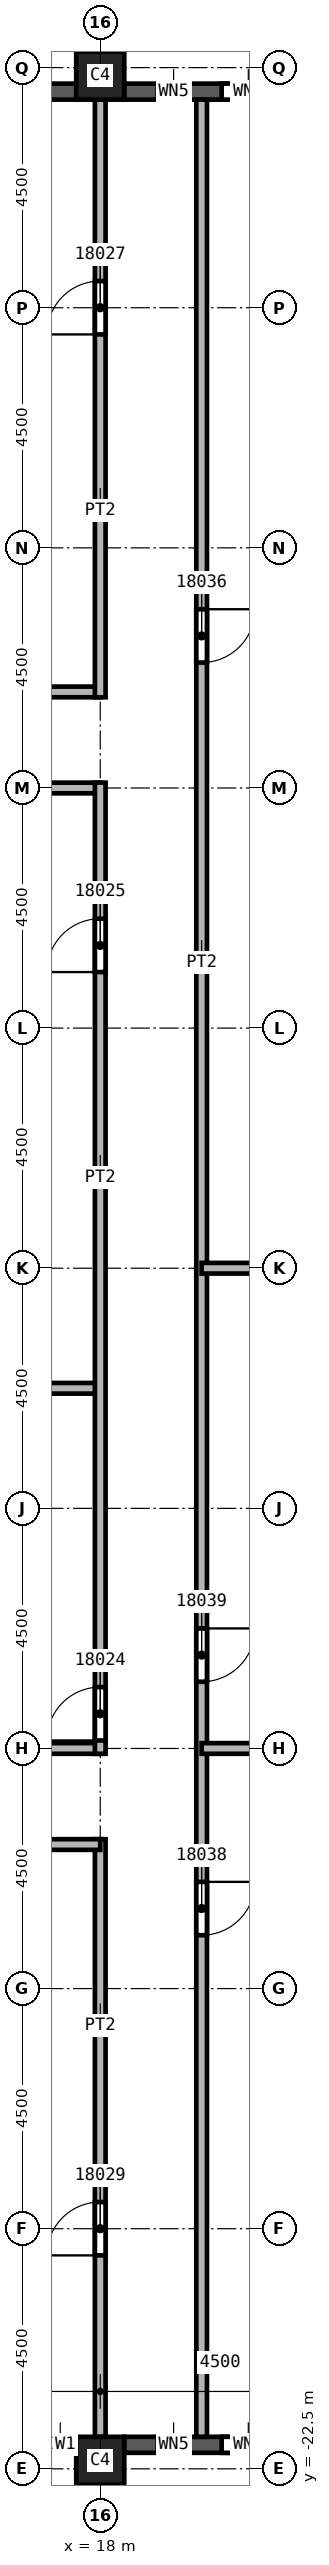
"""IFC4 building model, lengths in metres.
Left out: names, types, materials, properties, quantities, classifications, styles, units other than length and angle.
Written with IfcOpenShell. Run it as: python <this file> out.ifc"""

import sys

from ifc_helpers import new_model, si_unit, direction, frame, frame_2d, origin, origin_2d, place, context, subcontext, project, spatial, rectangle, extrude, element, fill, save


model = new_model("IFC4")
c1 = context("Model", 3, precision=1e-05, world=origin(), true_north=direction((0.0, 1.0)))
c2 = subcontext(c1, "Body", "Model", "MODEL_VIEW")
j1 = project(units=[si_unit("LENGTHUNIT", "METRE"), si_unit("PLANEANGLEUNIT", "RADIAN")], contexts=[c1])
p1 = place(None, origin())
s1 = spatial("IfcSite", under=j1, at=p1, CompositionType="ELEMENT")
p2 = place(p1, origin())
s2 = spatial("IfcBuilding", under=s1, at=p2, CompositionType="ELEMENT")
p3 = place(p2, frame((0.0, 0.0, 266.0)))
s3 = spatial("IfcBuildingStorey", under=s2, at=p3, CompositionType="ELEMENT", Elevation=266.0)
for number, where, z_axis, x_axis in (
    (1, (18.0, 22.35, 0.0), (0.0, 0.0, 1.0), (1.0, 0.0, 0.0)),
    (2, (18.0, -22.35, 0.0), (0.0, 0.0, 1.0), (1.0, 0.0, 0.0)),
):
    element("IfcColumn", number, at=place(p3, frame(where, z_axis=z_axis, x_axis=x_axis)), inside=s3, PredefinedType="COLUMN", context=c2, shape_type="SweptSolid", body=[
        extrude(rectangle(XDim=0.9, YDim=0.9, at=origin_2d()), origin(), (0.0, 0.0, 1.0), 3.72),
    ])
p4 = place(p3, frame((13.95, -22.05, 0.0), z_axis=(0.0, 0.0, 1.0), x_axis=(1.0, 0.0, 0.0)))
e3 = element("IfcWall", 3, at=p4, inside=s3, PredefinedType="SOLIDWALL", context=c2, shape_type="SweptSolid", body=[
    extrude(rectangle(XDim=3.6, YDim=0.3, at=frame_2d((1.8, 0.0))), origin(), (0.0, 0.0, 1.0), 3.12),
])
p5 = place(p4, frame((0.6, 0.0, 0.8)))
e4 = element("IfcOpeningElement", 4, at=p5, cuts=e3, PredefinedType="OPENING", context=c2, shape_type="SweptSolid", body=[
    extrude(rectangle(XDim=2.4, YDim=1.95, at=frame_2d((1.2, 0.975))), frame((0.0, 0.15, 0.0), z_axis=(0.0, -1.0, 0.0), x_axis=(1.0, 0.0, 0.0)), (0.0, 0.0, 1.0), 0.3),
])
p6 = place(p3, frame((18.45, -22.05, 0.0), z_axis=(0.0, 0.0, 1.0), x_axis=(1.0, 0.0, 0.0)))
e5 = element("IfcWall", 5, at=p6, inside=s3, PredefinedType="SOLIDWALL", context=c2, shape_type="SweptSolid", body=[
    extrude(rectangle(XDim=3.6, YDim=0.3, at=frame_2d((1.8, 0.0))), origin(), (0.0, 0.0, 1.0), 3.12),
])
p7 = place(p6, frame((0.625, 0.0, 0.8)))
e6 = element("IfcOpeningElement", 6, at=p7, cuts=e5, PredefinedType="OPENING", context=c2, shape_type="SweptSolid", body=[
    extrude(rectangle(XDim=0.6, YDim=1.95, at=frame_2d((0.3, 0.975))), frame((0.0, 0.15, 0.0), z_axis=(0.0, -1.0, 0.0), x_axis=(1.0, 0.0, 0.0)), (0.0, 0.0, 1.0), 0.3),
])
p8 = place(p6, frame((1.825, 0.0, 0.8)))
e7 = element("IfcOpeningElement", 7, at=p8, cuts=e5, PredefinedType="OPENING", context=c2, shape_type="SweptSolid", body=[
    extrude(rectangle(XDim=1.0, YDim=1.95, at=frame_2d((0.5, 0.975))), frame((0.0, 0.15, 0.0), z_axis=(0.0, -1.0, 0.0), x_axis=(1.0, 0.0, 0.0)), (0.0, 0.0, 1.0), 0.3),
])
p9 = place(p3, frame((22.05, 22.05, 0.0), z_axis=(0.0, 0.0, 1.0), x_axis=(-1.0, 0.0, 0.0)))
e8 = element("IfcWall", 8, at=p9, inside=s3, PredefinedType="SOLIDWALL", context=c2, shape_type="SweptSolid", body=[
    extrude(rectangle(XDim=3.6, YDim=0.3, at=frame_2d((1.8, 0.0))), origin(), (0.0, 0.0, 1.0), 3.12),
])
p10 = place(p9, frame((0.775, 0.0, 0.8)))
e9 = element("IfcOpeningElement", 9, at=p10, cuts=e8, PredefinedType="OPENING", context=c2, shape_type="SweptSolid", body=[
    extrude(rectangle(XDim=1.0, YDim=1.95, at=frame_2d((0.5, 0.975))), frame((0.0, 0.15, 0.0), z_axis=(0.0, -1.0, 0.0), x_axis=(1.0, 0.0, 0.0)), (0.0, 0.0, 1.0), 0.3),
])
p11 = place(p9, frame((2.375, 0.0, 0.8)))
e10 = element("IfcOpeningElement", 10, at=p11, cuts=e8, PredefinedType="OPENING", context=c2, shape_type="SweptSolid", body=[
    extrude(rectangle(XDim=0.6, YDim=1.95, at=frame_2d((0.3, 0.975))), frame((0.0, 0.15, 0.0), z_axis=(0.0, -1.0, 0.0), x_axis=(1.0, 0.0, 0.0)), (0.0, 0.0, 1.0), 0.3),
])
p12 = place(p3, frame((17.55, 22.05, 0.0), z_axis=(0.0, 0.0, 1.0), x_axis=(-1.0, 0.0, 0.0)))
e11 = element("IfcWall", 11, at=p12, inside=s3, PredefinedType="SOLIDWALL", context=c2, shape_type="SweptSolid", body=[
    extrude(rectangle(XDim=3.6, YDim=0.3, at=frame_2d((1.8, 0.0))), origin(), (0.0, 0.0, 1.0), 3.12),
])
p13 = place(p12, frame((0.6, 0.0, 0.8)))
e12 = element("IfcOpeningElement", 12, at=p13, cuts=e11, PredefinedType="OPENING", context=c2, shape_type="SweptSolid", body=[
    extrude(rectangle(XDim=2.4, YDim=1.95, at=frame_2d((1.2, 0.975))), frame((0.0, 0.15, 0.0), z_axis=(0.0, -1.0, 0.0), x_axis=(1.0, 0.0, 0.0)), (0.0, 0.0, 1.0), 0.3),
])
for number, where, z_axis, x_axis in (
    (13, (13.5, -9.0, 0.0), (0.0, 0.0, 1.0), (1.0, 0.0, 0.0)),
    (14, (13.5, -2.25, 0.0), (0.0, 0.0, 1.0), (1.0, 0.0, 0.0)),
    (15, (18.0, 9.0, 0.0), (0.0, 0.0, 1.0), (-1.0, 0.0, 0.0)),
):
    element("IfcWall", number, at=place(p3, frame(where, z_axis=z_axis, x_axis=x_axis)), inside=s3, PredefinedType="PARTITIONING", context=c2, shape_type="SweptSolid", body=[
        extrude(rectangle(XDim=4.5, YDim=0.2, at=frame_2d((2.25, 0.0))), origin(), (0.0, 0.0, 1.0), 3.72),
    ])
p14 = place(p3, frame((14.4, 10.8, 0.0), z_axis=(0.0, 0.0, 1.0), x_axis=(1.0, 0.0, 0.0)))
e16 = element("IfcWall", 16, at=p14, inside=s3, PredefinedType="PARTITIONING", context=c2, shape_type="SweptSolid", body=[
    extrude(rectangle(XDim=3.6, YDim=0.2, at=frame_2d((1.8, 0.0))), origin(), (0.0, 0.0, 1.0), 3.72),
])
p15 = place(p3, frame((18.0, -21.9, 0.0), z_axis=(0.0, 0.0, 1.0), x_axis=(0.0, 1.0, 0.0)))
e17 = element("IfcWall", 17, at=p15, inside=s3, PredefinedType="PARTITIONING", context=c2, shape_type="SweptSolid", body=[
    extrude(rectangle(XDim=11.2, YDim=0.2, at=frame_2d((5.6, 0.0))), origin(), (0.0, 0.0, 1.0), 3.72),
])
p16 = place(p15, frame((3.4, 0.0, 0.0)))
e18 = element("IfcOpeningElement", 18, at=p16, cuts=e17, PredefinedType="OPENING", context=c2, shape_type="SweptSolid", body=[
    extrude(rectangle(XDim=1.0, YDim=2.1, at=frame_2d((0.5, 1.05))), frame((0.0, 0.1, 0.0), z_axis=(0.0, -1.0, 0.0), x_axis=(1.0, 0.0, 0.0)), (0.0, 0.0, 1.0), 0.2),
])
p17 = place(p3, frame((18.0, -10.8, 0.0), z_axis=(0.0, 0.0, 1.0), x_axis=(-1.0, 0.0, 0.0)))
e19 = element("IfcWall", 19, at=p17, inside=s3, PredefinedType="PARTITIONING", context=c2, shape_type="SweptSolid", body=[
    extrude(rectangle(XDim=3.6, YDim=0.2, at=frame_2d((1.8, 0.0))), origin(), (0.0, 0.0, 1.0), 3.72),
])
p18 = place(p3, frame((18.0, -9.1, 0.0), z_axis=(0.0, 0.0, 1.0), x_axis=(0.0, 1.0, 0.0)))
e20 = element("IfcWall", 20, at=p18, inside=s3, PredefinedType="PARTITIONING", context=c2, shape_type="SweptSolid", body=[
    extrude(rectangle(XDim=18.2, YDim=0.2, at=frame_2d((9.1, 0.0))), origin(), (0.0, 0.0, 1.0), 3.72),
])
p19 = place(p18, frame((0.25, 0.0, 0.0)))
e21 = element("IfcOpeningElement", 21, at=p19, cuts=e20, PredefinedType="OPENING", context=c2, shape_type="SweptSolid", body=[
    extrude(rectangle(XDim=1.0, YDim=2.1, at=frame_2d((0.5, 1.05))), frame((0.0, 0.1, 0.0), z_axis=(0.0, -1.0, 0.0), x_axis=(1.0, 0.0, 0.0)), (0.0, 0.0, 1.0), 0.2),
])
p20 = place(p18, frame((14.65, 0.0, 0.0)))
e22 = element("IfcOpeningElement", 22, at=p20, cuts=e20, PredefinedType="OPENING", context=c2, shape_type="SweptSolid", body=[
    extrude(rectangle(XDim=1.0, YDim=2.1, at=frame_2d((0.5, 1.05))), frame((0.0, 0.1, 0.0), z_axis=(0.0, -1.0, 0.0), x_axis=(1.0, 0.0, 0.0)), (0.0, 0.0, 1.0), 0.2),
])
p21 = place(p3, frame((18.0, 10.7, 0.0), z_axis=(0.0, 0.0, 1.0), x_axis=(0.0, 1.0, 0.0)))
e23 = element("IfcWall", 23, at=p21, inside=s3, PredefinedType="PARTITIONING", context=c2, shape_type="SweptSolid", body=[
    extrude(rectangle(XDim=11.2, YDim=0.2, at=frame_2d((5.6, 0.0))), origin(), (0.0, 0.0, 1.0), 3.72),
])
p22 = place(p21, frame((6.8, 0.0, 0.0)))
e24 = element("IfcOpeningElement", 24, at=p22, cuts=e23, PredefinedType="OPENING", context=c2, shape_type="SweptSolid", body=[
    extrude(rectangle(XDim=1.0, YDim=2.1, at=frame_2d((0.5, 1.05))), frame((0.0, 0.1, 0.0), z_axis=(0.0, -1.0, 0.0), x_axis=(1.0, 0.0, 0.0)), (0.0, 0.0, 1.0), 0.2),
])
p23 = place(p3, frame((19.9, 21.9, 0.0), z_axis=(0.0, 0.0, 1.0), x_axis=(0.0, -1.0, 0.0)))
e25 = element("IfcWall", 25, at=p23, inside=s3, PredefinedType="PARTITIONING", context=c2, shape_type="SweptSolid", body=[
    extrude(rectangle(XDim=43.8, YDim=0.2, at=frame_2d((21.9, 0.0))), origin(), (0.0, 0.0, 1.0), 3.72),
])
p24 = place(p23, frame((9.55, 0.0, 0.0)))
e26 = element("IfcOpeningElement", 26, at=p24, cuts=e25, PredefinedType="OPENING", context=c2, shape_type="SweptSolid", body=[
    extrude(rectangle(XDim=1.0, YDim=2.1, at=frame_2d((0.5, 1.05))), frame((0.0, 0.1, 0.0), z_axis=(0.0, -1.0, 0.0), x_axis=(1.0, 0.0, 0.0)), (0.0, 0.0, 1.0), 0.2),
])
p25 = place(p23, frame((33.4, 0.0, 0.0)))
e27 = element("IfcOpeningElement", 27, at=p25, cuts=e25, PredefinedType="OPENING", context=c2, shape_type="SweptSolid", body=[
    extrude(rectangle(XDim=1.0, YDim=2.1, at=frame_2d((0.5, 1.05))), frame((0.0, 0.1, 0.0), z_axis=(0.0, -1.0, 0.0), x_axis=(1.0, 0.0, 0.0)), (0.0, 0.0, 1.0), 0.2),
])
p26 = place(p23, frame((28.65, 0.0, 0.0)))
e28 = element("IfcOpeningElement", 28, at=p26, cuts=e25, PredefinedType="OPENING", context=c2, shape_type="SweptSolid", body=[
    extrude(rectangle(XDim=1.0, YDim=2.1, at=frame_2d((0.5, 1.05))), frame((0.0, 0.1, 0.0), z_axis=(0.0, -1.0, 0.0), x_axis=(1.0, 0.0, 0.0)), (0.0, 0.0, 1.0), 0.2),
])
for number, where, z_axis, x_axis in (
    (29, (19.9, -9.0, 0.0), (0.0, 0.0, 1.0), (1.0, 0.0, 0.0)),
    (30, (26.55, 0.0, 0.0), (0.0, 0.0, 1.0), (-1.0, 0.0, 0.0)),
):
    element("IfcWall", number, at=place(p3, frame(where, z_axis=z_axis, x_axis=x_axis)), inside=s3, PredefinedType="PARTITIONING", context=c2, shape_type="SweptSolid", body=[
        extrude(rectangle(XDim=6.65, YDim=0.2, at=frame_2d((3.325, 0.0))), origin(), (0.0, 0.0, 1.0), 3.72),
    ])
p27 = place(p19, origin())
e31 = element("IfcDoor", 31, at=p27, inside=s3, OperationType="SINGLE_SWING_LEFT", PredefinedType="DOOR", context=c2, shape_type="SweptSolid", body=[
    extrude(rectangle(XDim=1.0, YDim=2.1, at=frame_2d((0.5, 1.05))), frame((0.0, 0.025, 0.0), z_axis=(0.0, -1.0, 0.0), x_axis=(1.0, 0.0, 0.0)), (0.0, 0.0, 1.0), 0.05),
])
fill(e21, e31)
p28 = place(p20, origin())
e32 = element("IfcDoor", 32, at=p28, inside=s3, OperationType="SINGLE_SWING_RIGHT", PredefinedType="DOOR", context=c2, shape_type="SweptSolid", body=[
    extrude(rectangle(XDim=1.0, YDim=2.1, at=frame_2d((0.5, 1.05))), frame((0.0, 0.025, 0.0), z_axis=(0.0, -1.0, 0.0), x_axis=(1.0, 0.0, 0.0)), (0.0, 0.0, 1.0), 0.05),
])
fill(e22, e32)
p29 = place(p22, origin())
e33 = element("IfcDoor", 33, at=p29, inside=s3, OperationType="SINGLE_SWING_RIGHT", PredefinedType="DOOR", context=c2, shape_type="SweptSolid", body=[
    extrude(rectangle(XDim=1.0, YDim=2.1, at=frame_2d((0.5, 1.05))), frame((0.0, 0.025, 0.0), z_axis=(0.0, -1.0, 0.0), x_axis=(1.0, 0.0, 0.0)), (0.0, 0.0, 1.0), 0.05),
])
fill(e24, e33)
p30 = place(p16, origin())
e34 = element("IfcDoor", 34, at=p30, inside=s3, OperationType="SINGLE_SWING_RIGHT", PredefinedType="DOOR", context=c2, shape_type="SweptSolid", body=[
    extrude(rectangle(XDim=1.0, YDim=2.1, at=frame_2d((0.5, 1.05))), frame((0.0, 0.025, 0.0), z_axis=(0.0, -1.0, 0.0), x_axis=(1.0, 0.0, 0.0)), (0.0, 0.0, 1.0), 0.05),
])
fill(e18, e34)
p31 = place(p24, origin())
e35 = element("IfcDoor", 35, at=p31, inside=s3, OperationType="SINGLE_SWING_LEFT", PredefinedType="DOOR", context=c2, shape_type="SweptSolid", body=[
    extrude(rectangle(XDim=1.0, YDim=2.1, at=frame_2d((0.5, 1.05))), frame((0.0, 0.025, 0.0), z_axis=(0.0, -1.0, 0.0), x_axis=(1.0, 0.0, 0.0)), (0.0, 0.0, 1.0), 0.05),
])
fill(e26, e35)
p32 = place(p25, origin())
e36 = element("IfcDoor", 36, at=p32, inside=s3, OperationType="SINGLE_SWING_LEFT", PredefinedType="DOOR", context=c2, shape_type="SweptSolid", body=[
    extrude(rectangle(XDim=1.0, YDim=2.1, at=frame_2d((0.5, 1.05))), frame((0.0, 0.025, 0.0), z_axis=(0.0, -1.0, 0.0), x_axis=(1.0, 0.0, 0.0)), (0.0, 0.0, 1.0), 0.05),
])
fill(e27, e36)
p33 = place(p26, origin())
e37 = element("IfcDoor", 37, at=p33, inside=s3, OperationType="SINGLE_SWING_RIGHT", PredefinedType="DOOR", context=c2, shape_type="SweptSolid", body=[
    extrude(rectangle(XDim=1.0, YDim=2.1, at=frame_2d((0.5, 1.05))), frame((0.0, 0.025, 0.0), z_axis=(0.0, -1.0, 0.0), x_axis=(1.0, 0.0, 0.0)), (0.0, 0.0, 1.0), 0.05),
])
fill(e28, e37)
p34 = place(p7, origin())
e38 = element("IfcWindow", 38, at=p34, inside=s3, PartitioningType="SINGLE_PANEL", PredefinedType="WINDOW", context=c2, shape_type="SweptSolid", body=[
    extrude(rectangle(XDim=0.6, YDim=1.95, at=frame_2d((0.3, 0.975))), frame((0.0, 0.03, 0.0), z_axis=(0.0, -1.0, 0.0), x_axis=(1.0, 0.0, 0.0)), (0.0, 0.0, 1.0), 0.06),
])
fill(e6, e38)
p35 = place(p8, origin())
e39 = element("IfcWindow", 39, at=p35, inside=s3, PartitioningType="SINGLE_PANEL", PredefinedType="WINDOW", context=c2, shape_type="SweptSolid", body=[
    extrude(rectangle(XDim=1.0, YDim=1.95, at=frame_2d((0.5, 0.975))), frame((0.0, 0.03, 0.0), z_axis=(0.0, -1.0, 0.0), x_axis=(1.0, 0.0, 0.0)), (0.0, 0.0, 1.0), 0.06),
])
fill(e7, e39)
p36 = place(p10, origin())
e40 = element("IfcWindow", 40, at=p36, inside=s3, PartitioningType="SINGLE_PANEL", PredefinedType="WINDOW", context=c2, shape_type="SweptSolid", body=[
    extrude(rectangle(XDim=1.0, YDim=1.95, at=frame_2d((0.5, 0.975))), frame((0.0, 0.03, 0.0), z_axis=(0.0, -1.0, 0.0), x_axis=(1.0, 0.0, 0.0)), (0.0, 0.0, 1.0), 0.06),
])
fill(e9, e40)
p37 = place(p11, origin())
e41 = element("IfcWindow", 41, at=p37, inside=s3, PartitioningType="SINGLE_PANEL", PredefinedType="WINDOW", context=c2, shape_type="SweptSolid", body=[
    extrude(rectangle(XDim=0.6, YDim=1.95, at=frame_2d((0.3, 0.975))), frame((0.0, 0.03, 0.0), z_axis=(0.0, -1.0, 0.0), x_axis=(1.0, 0.0, 0.0)), (0.0, 0.0, 1.0), 0.06),
])
fill(e10, e41)
save(model, sys.argv[1])
